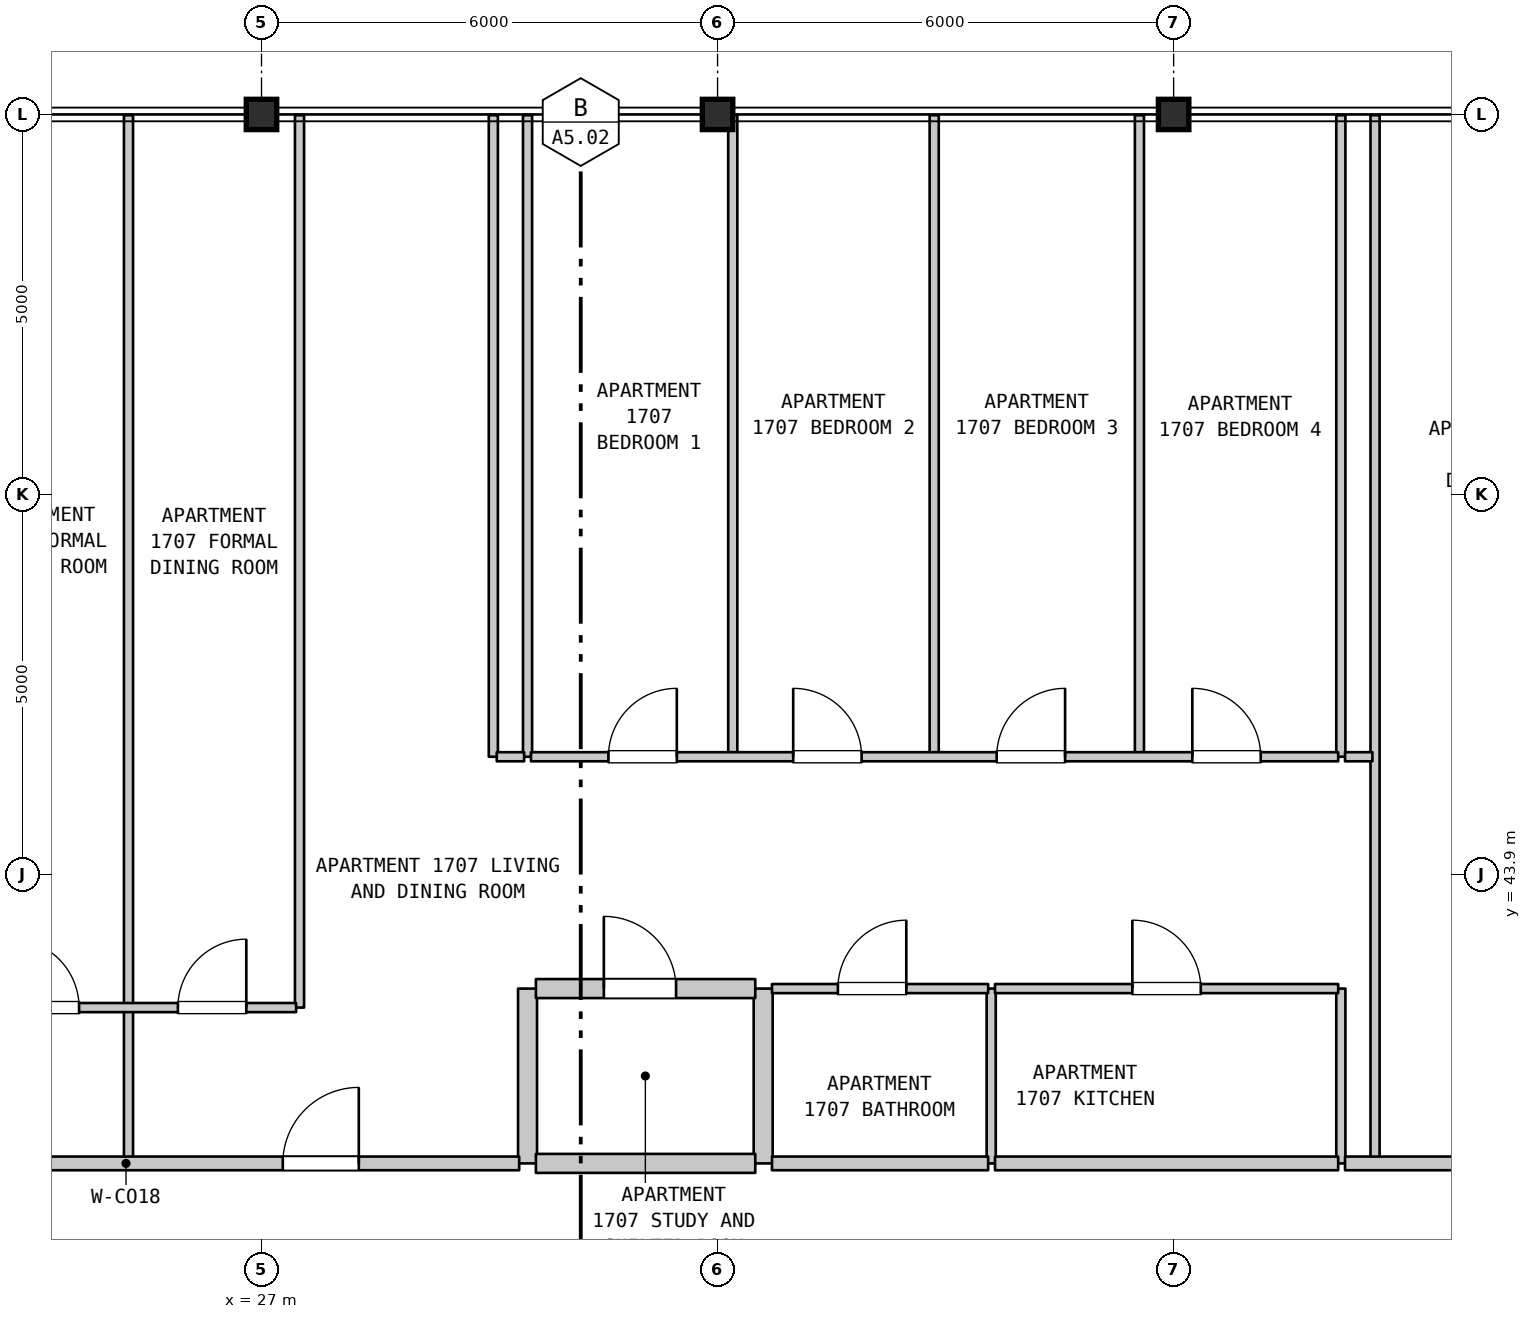
"""IFC4 building model, lengths in metres.
Left out: names, types, materials, properties, quantities, classifications, styles, units other than length and angle.
Written with IfcOpenShell. Run it as: python <this file> out.ifc"""

import sys

from ifc_helpers import new_model, si_unit, direction, frame, frame_2d, origin, origin_2d, place, context, subcontext, project, spatial, rectangle, i_section, extrude, element, fill, save


model = new_model("IFC4")
c1 = context("Model", 3, precision=1e-05, world=origin(), true_north=direction((0.0, 1.0)))
c2 = subcontext(c1, "Body", "Model", "MODEL_VIEW")
j1 = project(units=[si_unit("LENGTHUNIT", "METRE"), si_unit("PLANEANGLEUNIT", "RADIAN")], contexts=[c1])
p1 = place(None, origin())
s1 = spatial("IfcSite", under=j1, at=p1, CompositionType="ELEMENT")
p2 = place(p1, origin())
s2 = spatial("IfcBuilding", under=s1, at=p2, CompositionType="ELEMENT")
p3 = place(p2, frame((0.0, 0.0, 73.8)))
s3 = spatial("IfcBuildingStorey", under=s2, at=p3, CompositionType="ELEMENT", Elevation=73.8)
for number, where, z_axis, x_axis in (
    (1, (27.0, 53.9, 0.0), (0.0, 0.0, 1.0), (1.0, 0.0, 0.0)),
    (2, (33.0, 53.9, 0.0), (0.0, 0.0, 1.0), (1.0, 0.0, 0.0)),
    (3, (39.0, 53.9, 0.0), (0.0, 0.0, 1.0), (1.0, 0.0, 0.0)),
):
    element("IfcColumn", number, at=place(p3, frame(where, z_axis=z_axis, x_axis=x_axis)), inside=s3, PredefinedType="COLUMN", context=c2, shape_type="SweptSolid", body=[
        extrude(i_section(OverallWidth=0.401, OverallDepth=0.399, WebThickness=0.025, FlangeThickness=0.04, FilletRadius=0.015, at=origin_2d()), origin(), (0.0, 0.0, 1.0), 3.7),
    ])
p4 = place(p3, frame((25.25, 40.1, 0.0), z_axis=(0.0, 0.0, 1.0), x_axis=(0.0, 1.0, 0.0)))
e4 = element("IfcWall", 4, at=p4, inside=s3, PredefinedType="PARTITIONING", context=c2, shape_type="SweptSolid", body=[
    extrude(rectangle(XDim=2.05, YDim=0.12, at=frame_2d((1.025, 0.0))), origin(), (0.0, 0.0, 1.0), 3.385),
])
for number, where, z_axis, x_axis in (
    (5, (25.25, 42.15, 0.0), (0.0, 0.0, 1.0), (0.0, 1.0, 0.0)),
    (6, (27.5, 42.15, 0.0), (0.0, 0.0, 1.0), (0.0, 1.0, 0.0)),
):
    element("IfcWall", number, at=place(p3, frame(where, z_axis=z_axis, x_axis=x_axis)), inside=s3, PredefinedType="PARTITIONING", context=c2, shape_type="SweptSolid", body=[
        extrude(rectangle(XDim=11.74, YDim=0.12, at=frame_2d((5.87, 0.0))), origin(), (0.0, 0.0, 1.0), 3.385),
    ])
p5 = place(p3, frame((30.05, 45.45, 0.0), z_axis=(0.0, 0.0, 1.0), x_axis=(0.0, 1.0, 0.0)))
e7 = element("IfcWall", 7, at=p5, inside=s3, PredefinedType="PARTITIONING", context=c2, shape_type="SweptSolid", body=[
    extrude(rectangle(XDim=8.44, YDim=0.12, at=frame_2d((4.22, 0.0))), origin(), (0.0, 0.0, 1.0), 3.385),
])
p6 = place(p3, frame((30.5, 40.1, 0.0), z_axis=(0.0, 0.0, 1.0), x_axis=(0.0, 1.0, 0.0)))
e8 = element("IfcWall", 8, at=p6, inside=s3, PredefinedType="STANDARD", context=c2, shape_type="SweptSolid", body=[
    extrude(rectangle(XDim=2.3, YDim=0.25, at=frame_2d((1.15, 0.0))), origin(), (0.0, 0.0, 1.0), 3.385),
])
for number, where, z_axis, x_axis in (
    (9, (30.5, 45.45, 0.0), (0.0, 0.0, 1.0), (0.0, 1.0, 0.0)),
    (10, (33.2, 45.45, 0.0), (0.0, 0.0, 1.0), (0.0, 1.0, 0.0)),
):
    element("IfcWall", number, at=place(p3, frame(where, z_axis=z_axis, x_axis=x_axis)), inside=s3, PredefinedType="PARTITIONING", context=c2, shape_type="SweptSolid", body=[
        extrude(rectangle(XDim=8.44, YDim=0.12, at=frame_2d((4.22, 0.0))), origin(), (0.0, 0.0, 1.0), 3.385),
    ])
p7 = place(p3, frame((33.6, 40.1, 0.0), z_axis=(0.0, 0.0, 1.0), x_axis=(0.0, 1.0, 0.0)))
e11 = element("IfcWall", 11, at=p7, inside=s3, PredefinedType="STANDARD", context=c2, shape_type="SweptSolid", body=[
    extrude(rectangle(XDim=2.3, YDim=0.25, at=frame_2d((1.15, 0.0))), origin(), (0.0, 0.0, 1.0), 3.385),
])
p8 = place(p3, frame((35.85, 45.45, 0.0), z_axis=(0.0, 0.0, 1.0), x_axis=(0.0, 1.0, 0.0)))
e12 = element("IfcWall", 12, at=p8, inside=s3, PredefinedType="PARTITIONING", context=c2, shape_type="SweptSolid", body=[
    extrude(rectangle(XDim=8.44, YDim=0.12, at=frame_2d((4.22, 0.0))), origin(), (0.0, 0.0, 1.0), 3.385),
])
p9 = place(p3, frame((36.6, 40.1, 0.0), z_axis=(0.0, 0.0, 1.0), x_axis=(0.0, 1.0, 0.0)))
e13 = element("IfcWall", 13, at=p9, inside=s3, PredefinedType="PARTITIONING", context=c2, shape_type="SweptSolid", body=[
    extrude(rectangle(XDim=2.3, YDim=0.12, at=frame_2d((1.15, 0.0))), origin(), (0.0, 0.0, 1.0), 3.385),
])
p10 = place(p3, frame((38.55, 45.45, 0.0), z_axis=(0.0, 0.0, 1.0), x_axis=(0.0, 1.0, 0.0)))
e14 = element("IfcWall", 14, at=p10, inside=s3, PredefinedType="PARTITIONING", context=c2, shape_type="SweptSolid", body=[
    extrude(rectangle(XDim=8.44, YDim=0.12, at=frame_2d((4.22, 0.0))), origin(), (0.0, 0.0, 1.0), 3.385),
])
p11 = place(p3, frame((41.2, 40.1, 0.0), z_axis=(0.0, 0.0, 1.0), x_axis=(0.0, 1.0, 0.0)))
e15 = element("IfcWall", 15, at=p11, inside=s3, PredefinedType="PARTITIONING", context=c2, shape_type="SweptSolid", body=[
    extrude(rectangle(XDim=2.3, YDim=0.12, at=frame_2d((1.15, 0.0))), origin(), (0.0, 0.0, 1.0), 3.385),
])
p12 = place(p3, frame((41.2, 45.45, 0.0), z_axis=(0.0, 0.0, 1.0), x_axis=(0.0, 1.0, 0.0)))
e16 = element("IfcWall", 16, at=p12, inside=s3, PredefinedType="PARTITIONING", context=c2, shape_type="SweptSolid", body=[
    extrude(rectangle(XDim=8.44, YDim=0.12, at=frame_2d((4.22, 0.0))), origin(), (0.0, 0.0, 1.0), 3.385),
])
p13 = place(p3, frame((41.65, 40.1, 0.0), z_axis=(0.0, 0.0, 1.0), x_axis=(0.0, 1.0, 0.0)))
e17 = element("IfcWall", 17, at=p13, inside=s3, PredefinedType="PARTITIONING", context=c2, shape_type="SweptSolid", body=[
    extrude(rectangle(XDim=13.79, YDim=0.12, at=frame_2d((6.895, 0.0))), origin(), (0.0, 0.0, 1.0), 3.385),
])
p14 = place(p3, frame((20.045, 40.1, 0.0), z_axis=(0.0, 0.0, 1.0), x_axis=(1.0, 0.0, 0.0)))
e18 = element("IfcWall", 18, at=p14, inside=s3, PredefinedType="STANDARD", context=c2, shape_type="SweptSolid", body=[
    extrude(rectangle(XDim=10.345, YDim=0.18, at=frame_2d((5.172, 0.0))), origin(), (0.0, 0.0, 1.0), 3.385),
])
p15 = place(p14, frame((2.035, 0.0, 0.0)))
e19 = element("IfcOpeningElement", 19, at=p15, cuts=e18, PredefinedType="OPENING", context=c2, shape_type="SweptSolid", body=[
    extrude(rectangle(XDim=1.0, YDim=2.15, at=frame_2d((0.5, 1.075))), frame((0.0, 0.1, 0.0), z_axis=(0.0, -1.0, 0.0), x_axis=(1.0, 0.0, 0.0)), (0.0, 0.0, 1.0), 0.2),
])
p16 = place(p14, frame((7.235, 0.0, 0.0)))
e20 = element("IfcOpeningElement", 20, at=p16, cuts=e18, PredefinedType="OPENING", context=c2, shape_type="SweptSolid", body=[
    extrude(rectangle(XDim=1.0, YDim=2.15, at=frame_2d((0.5, 1.075))), frame((0.0, 0.1, 0.0), z_axis=(0.0, -1.0, 0.0), x_axis=(1.0, 0.0, 0.0)), (0.0, 0.0, 1.0), 0.2),
])
p17 = place(p3, frame((30.61, 40.1, 0.0), z_axis=(0.0, 0.0, 1.0), x_axis=(1.0, 0.0, 0.0)))
e21 = element("IfcWall", 21, at=p17, inside=s3, PredefinedType="STANDARD", context=c2, shape_type="SweptSolid", body=[
    extrude(rectangle(XDim=2.886, YDim=0.25, at=frame_2d((1.443, 0.0))), origin(), (0.0, 0.0, 1.0), 3.385),
])
p18 = place(p3, frame((33.716, 40.1, 0.0), z_axis=(0.0, 0.0, 1.0), x_axis=(1.0, 0.0, 0.0)))
e22 = element("IfcWall", 22, at=p18, inside=s3, PredefinedType="STANDARD", context=c2, shape_type="SweptSolid", body=[
    extrude(rectangle(XDim=2.844, YDim=0.18, at=frame_2d((1.422, 0.0))), origin(), (0.0, 0.0, 1.0), 3.385),
])
p19 = place(p3, frame((36.65, 40.1, 0.0), z_axis=(0.0, 0.0, 1.0), x_axis=(1.0, 0.0, 0.0)))
e23 = element("IfcWall", 23, at=p19, inside=s3, PredefinedType="STANDARD", context=c2, shape_type="SweptSolid", body=[
    extrude(rectangle(XDim=4.515, YDim=0.18, at=frame_2d((2.258, 0.0))), origin(), (0.0, 0.0, 1.0), 3.385),
])
p20 = place(p3, frame((41.255, 40.1, 0.0), z_axis=(0.0, 0.0, 1.0), x_axis=(1.0, 0.0, 0.0)))
e24 = element("IfcWall", 24, at=p20, inside=s3, PredefinedType="STANDARD", context=c2, shape_type="SweptSolid", body=[
    extrude(rectangle(XDim=3.96, YDim=0.18, at=frame_2d((1.98, 0.0))), origin(), (0.0, 0.0, 1.0), 3.385),
])
p21 = place(p20, frame((1.609, 0.0, 0.0)))
e25 = element("IfcOpeningElement", 25, at=p21, cuts=e24, PredefinedType="OPENING", context=c2, shape_type="SweptSolid", body=[
    extrude(rectangle(XDim=1.0, YDim=2.15, at=frame_2d((0.5, 1.075))), frame((0.0, 0.1, 0.0), z_axis=(0.0, -1.0, 0.0), x_axis=(1.0, 0.0, 0.0)), (0.0, 0.0, 1.0), 0.2),
])
p22 = place(p3, frame((23.045, 42.15, 0.0), z_axis=(0.0, 0.0, 1.0), x_axis=(1.0, 0.0, 0.0)))
e26 = element("IfcWall", 26, at=p22, inside=s3, PredefinedType="PARTITIONING", context=c2, shape_type="SweptSolid", body=[
    extrude(rectangle(XDim=4.41, YDim=0.12, at=frame_2d((2.205, 0.0))), origin(), (0.0, 0.0, 1.0), 3.385),
])
p23 = place(p22, frame((0.655, 0.0, 0.0)))
e27 = element("IfcOpeningElement", 27, at=p23, cuts=e26, PredefinedType="OPENING", context=c2, shape_type="SweptSolid", body=[
    extrude(rectangle(XDim=0.9, YDim=2.15, at=frame_2d((0.45, 1.075))), frame((0.0, 0.07, 0.0), z_axis=(0.0, -1.0, 0.0), x_axis=(1.0, 0.0, 0.0)), (0.0, 0.0, 1.0), 0.14),
])
p24 = place(p22, frame((2.855, 0.0, 0.0)))
e28 = element("IfcOpeningElement", 28, at=p24, cuts=e26, PredefinedType="OPENING", context=c2, shape_type="SweptSolid", body=[
    extrude(rectangle(XDim=0.9, YDim=2.15, at=frame_2d((0.45, 1.075))), frame((0.0, 0.07, 0.0), z_axis=(0.0, -1.0, 0.0), x_axis=(1.0, 0.0, 0.0)), (0.0, 0.0, 1.0), 0.14),
])
p25 = place(p3, frame((30.61, 42.4, 0.0), z_axis=(0.0, 0.0, 1.0), x_axis=(1.0, 0.0, 0.0)))
e29 = element("IfcWall", 29, at=p25, inside=s3, PredefinedType="STANDARD", context=c2, shape_type="SweptSolid", body=[
    extrude(rectangle(XDim=2.886, YDim=0.25, at=frame_2d((1.443, 0.0))), origin(), (0.0, 0.0, 1.0), 3.385),
])
p26 = place(p25, frame((0.894, 0.0, 0.0)))
e30 = element("IfcOpeningElement", 30, at=p26, cuts=e29, PredefinedType="OPENING", context=c2, shape_type="SweptSolid", body=[
    extrude(rectangle(XDim=0.95, YDim=2.15, at=frame_2d((0.475, 1.075))), frame((0.0, 0.135, 0.0), z_axis=(0.0, -1.0, 0.0), x_axis=(1.0, 0.0, 0.0)), (0.0, 0.0, 1.0), 0.27),
])
p27 = place(p3, frame((33.716, 42.4, 0.0), z_axis=(0.0, 0.0, 1.0), x_axis=(1.0, 0.0, 0.0)))
e31 = element("IfcWall", 31, at=p27, inside=s3, PredefinedType="PARTITIONING", context=c2, shape_type="SweptSolid", body=[
    extrude(rectangle(XDim=2.844, YDim=0.12, at=frame_2d((1.422, 0.0))), origin(), (0.0, 0.0, 1.0), 3.385),
])
p28 = place(p27, frame((0.867, 0.0, 0.0)))
e32 = element("IfcOpeningElement", 32, at=p28, cuts=e31, PredefinedType="OPENING", context=c2, shape_type="SweptSolid", body=[
    extrude(rectangle(XDim=0.9, YDim=2.1, at=frame_2d((0.45, 1.05))), frame((0.0, 0.07, 0.0), z_axis=(0.0, -1.0, 0.0), x_axis=(1.0, 0.0, 0.0)), (0.0, 0.0, 1.0), 0.14),
])
p29 = place(p3, frame((36.65, 42.4, 0.0), z_axis=(0.0, 0.0, 1.0), x_axis=(1.0, 0.0, 0.0)))
e33 = element("IfcWall", 33, at=p29, inside=s3, PredefinedType="PARTITIONING", context=c2, shape_type="SweptSolid", body=[
    extrude(rectangle(XDim=4.515, YDim=0.12, at=frame_2d((2.258, 0.0))), origin(), (0.0, 0.0, 1.0), 3.385),
])
p30 = place(p29, frame((1.807, 0.0, 0.0)))
e34 = element("IfcOpeningElement", 34, at=p30, cuts=e33, PredefinedType="OPENING", context=c2, shape_type="SweptSolid", body=[
    extrude(rectangle(XDim=0.9, YDim=2.15, at=frame_2d((0.45, 1.075))), frame((0.0, 0.07, 0.0), z_axis=(0.0, -1.0, 0.0), x_axis=(1.0, 0.0, 0.0)), (0.0, 0.0, 1.0), 0.14),
])
p31 = place(p3, frame((30.095, 45.45, 0.0), z_axis=(0.0, 0.0, 1.0), x_axis=(1.0, 0.0, 0.0)))
e35 = element("IfcWall", 35, at=p31, inside=s3, PredefinedType="PARTITIONING", context=c2, shape_type="SweptSolid", body=[
    extrude(rectangle(XDim=0.36, YDim=0.12, at=frame_2d((0.18, 0.0))), origin(), (0.0, 0.0, 1.0), 3.385),
])
p32 = place(p3, frame((30.545, 45.45, 0.0), z_axis=(0.0, 0.0, 1.0), x_axis=(1.0, 0.0, 0.0)))
e36 = element("IfcWall", 36, at=p32, inside=s3, PredefinedType="PARTITIONING", context=c2, shape_type="SweptSolid", body=[
    extrude(rectangle(XDim=10.62, YDim=0.12, at=frame_2d((5.31, 0.0))), origin(), (0.0, 0.0, 1.0), 3.385),
])
p33 = place(p32, frame((1.019, 0.0, 0.0)))
e37 = element("IfcOpeningElement", 37, at=p33, cuts=e36, PredefinedType="OPENING", context=c2, shape_type="SweptSolid", body=[
    extrude(rectangle(XDim=0.9, YDim=2.15, at=frame_2d((0.45, 1.075))), frame((0.0, 0.07, 0.0), z_axis=(0.0, -1.0, 0.0), x_axis=(1.0, 0.0, 0.0)), (0.0, 0.0, 1.0), 0.14),
])
p34 = place(p32, frame((3.45, 0.0, 0.0)))
e38 = element("IfcOpeningElement", 38, at=p34, cuts=e36, PredefinedType="OPENING", context=c2, shape_type="SweptSolid", body=[
    extrude(rectangle(XDim=0.9, YDim=2.15, at=frame_2d((0.45, 1.075))), frame((0.0, 0.07, 0.0), z_axis=(0.0, -1.0, 0.0), x_axis=(1.0, 0.0, 0.0)), (0.0, 0.0, 1.0), 0.14),
])
p35 = place(p32, frame((6.127, 0.0, 0.0)))
e39 = element("IfcOpeningElement", 39, at=p35, cuts=e36, PredefinedType="OPENING", context=c2, shape_type="SweptSolid", body=[
    extrude(rectangle(XDim=0.9, YDim=2.15, at=frame_2d((0.45, 1.075))), frame((0.0, 0.07, 0.0), z_axis=(0.0, -1.0, 0.0), x_axis=(1.0, 0.0, 0.0)), (0.0, 0.0, 1.0), 0.14),
])
p36 = place(p32, frame((8.701, 0.0, 0.0)))
e40 = element("IfcOpeningElement", 40, at=p36, cuts=e36, PredefinedType="OPENING", context=c2, shape_type="SweptSolid", body=[
    extrude(rectangle(XDim=0.9, YDim=2.15, at=frame_2d((0.45, 1.075))), frame((0.0, 0.07, 0.0), z_axis=(0.0, -1.0, 0.0), x_axis=(1.0, 0.0, 0.0)), (0.0, 0.0, 1.0), 0.14),
])
p37 = place(p3, frame((41.255, 45.45, 0.0), z_axis=(0.0, 0.0, 1.0), x_axis=(1.0, 0.0, 0.0)))
e41 = element("IfcWall", 41, at=p37, inside=s3, PredefinedType="PARTITIONING", context=c2, shape_type="SweptSolid", body=[
    extrude(rectangle(XDim=0.36, YDim=0.12, at=frame_2d((0.18, 0.0))), origin(), (0.0, 0.0, 1.0), 3.385),
])
p38 = place(p16, origin())
e42 = element("IfcDoor", 42, at=p38, inside=s3, OperationType="SINGLE_SWING_RIGHT", PredefinedType="DOOR", context=c2, shape_type="SweptSolid", body=[
    extrude(rectangle(XDim=1.0, YDim=2.15, at=frame_2d((0.5, 1.075))), frame((0.0, 0.025, 0.0), z_axis=(0.0, -1.0, 0.0), x_axis=(1.0, 0.0, 0.0)), (0.0, 0.0, 1.0), 0.05),
])
fill(e20, e42)
p39 = place(p23, origin())
e43 = element("IfcDoor", 43, at=p39, inside=s3, OperationType="SINGLE_SWING_LEFT", PredefinedType="DOOR", context=c2, shape_type="SweptSolid", body=[
    extrude(rectangle(XDim=0.9, YDim=2.15, at=frame_2d((0.45, 1.075))), frame((0.0, 0.025, 0.0), z_axis=(0.0, -1.0, 0.0), x_axis=(1.0, 0.0, 0.0)), (0.0, 0.0, 1.0), 0.05),
])
fill(e27, e43)
p40 = place(p24, origin())
e44 = element("IfcDoor", 44, at=p40, inside=s3, OperationType="SINGLE_SWING_RIGHT", PredefinedType="DOOR", context=c2, shape_type="SweptSolid", body=[
    extrude(rectangle(XDim=0.9, YDim=2.15, at=frame_2d((0.45, 1.075))), frame((0.0, 0.025, 0.0), z_axis=(0.0, -1.0, 0.0), x_axis=(1.0, 0.0, 0.0)), (0.0, 0.0, 1.0), 0.05),
])
fill(e28, e44)
p41 = place(p26, origin())
e45 = element("IfcDoor", 45, at=p41, inside=s3, OperationType="SINGLE_SWING_LEFT", PredefinedType="DOOR", context=c2, shape_type="SweptSolid", body=[
    extrude(rectangle(XDim=0.95, YDim=2.15, at=frame_2d((0.475, 1.075))), frame((0.0, 0.025, 0.0), z_axis=(0.0, -1.0, 0.0), x_axis=(1.0, 0.0, 0.0)), (0.0, 0.0, 1.0), 0.05),
])
fill(e30, e45)
p42 = place(p28, origin())
e46 = element("IfcDoor", 46, at=p42, inside=s3, OperationType="SINGLE_SWING_RIGHT", PredefinedType="DOOR", context=c2, shape_type="SweptSolid", body=[
    extrude(rectangle(XDim=0.9, YDim=2.1, at=frame_2d((0.45, 1.05))), frame((0.0, 0.025, 0.0), z_axis=(0.0, -1.0, 0.0), x_axis=(1.0, 0.0, 0.0)), (0.0, 0.0, 1.0), 0.05),
])
fill(e32, e46)
p43 = place(p30, origin())
e47 = element("IfcDoor", 47, at=p43, inside=s3, OperationType="SINGLE_SWING_LEFT", PredefinedType="DOOR", context=c2, shape_type="SweptSolid", body=[
    extrude(rectangle(XDim=0.9, YDim=2.15, at=frame_2d((0.45, 1.075))), frame((0.0, 0.025, 0.0), z_axis=(0.0, -1.0, 0.0), x_axis=(1.0, 0.0, 0.0)), (0.0, 0.0, 1.0), 0.05),
])
fill(e34, e47)
p44 = place(p33, origin())
e48 = element("IfcDoor", 48, at=p44, inside=s3, OperationType="SINGLE_SWING_RIGHT", PredefinedType="DOOR", context=c2, shape_type="SweptSolid", body=[
    extrude(rectangle(XDim=0.9, YDim=2.15, at=frame_2d((0.45, 1.075))), frame((0.0, 0.025, 0.0), z_axis=(0.0, -1.0, 0.0), x_axis=(1.0, 0.0, 0.0)), (0.0, 0.0, 1.0), 0.05),
])
fill(e37, e48)
p45 = place(p34, origin())
e49 = element("IfcDoor", 49, at=p45, inside=s3, OperationType="SINGLE_SWING_LEFT", PredefinedType="DOOR", context=c2, shape_type="SweptSolid", body=[
    extrude(rectangle(XDim=0.9, YDim=2.15, at=frame_2d((0.45, 1.075))), frame((0.0, 0.025, 0.0), z_axis=(0.0, -1.0, 0.0), x_axis=(1.0, 0.0, 0.0)), (0.0, 0.0, 1.0), 0.05),
])
fill(e38, e49)
p46 = place(p35, origin())
e50 = element("IfcDoor", 50, at=p46, inside=s3, OperationType="SINGLE_SWING_RIGHT", PredefinedType="DOOR", context=c2, shape_type="SweptSolid", body=[
    extrude(rectangle(XDim=0.9, YDim=2.15, at=frame_2d((0.45, 1.075))), frame((0.0, 0.025, 0.0), z_axis=(0.0, -1.0, 0.0), x_axis=(1.0, 0.0, 0.0)), (0.0, 0.0, 1.0), 0.05),
])
fill(e39, e50)
p47 = place(p36, origin())
e51 = element("IfcDoor", 51, at=p47, inside=s3, OperationType="SINGLE_SWING_LEFT", PredefinedType="DOOR", context=c2, shape_type="SweptSolid", body=[
    extrude(rectangle(XDim=0.9, YDim=2.15, at=frame_2d((0.45, 1.075))), frame((0.0, 0.025, 0.0), z_axis=(0.0, -1.0, 0.0), x_axis=(1.0, 0.0, 0.0)), (0.0, 0.0, 1.0), 0.05),
])
fill(e40, e51)
save(model, sys.argv[1])
